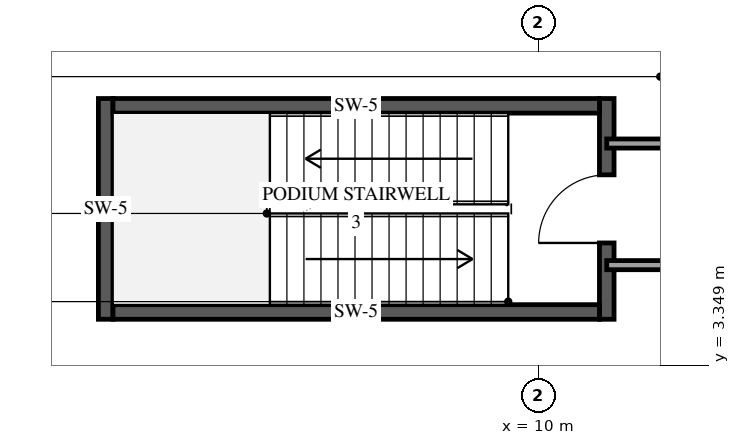
"""IFC4 building model, lengths in metres.
Left out: names, types, materials, properties, quantities, classifications, styles, units other than length and angle.
Written with IfcOpenShell. Run it as: python <this file> out.ifc"""

import sys

from ifc_helpers import new_model, si_unit, direction, frame, frame_2d, origin, place, context, subcontext, project, spatial, rectangle, extrude, element, fill, save


model = new_model("IFC4")
c1 = context("Model", 3, precision=1e-05, world=origin(), true_north=direction((0.0, 1.0)))
c2 = subcontext(c1, "Body", "Model", "MODEL_VIEW")
j1 = project(units=[si_unit("LENGTHUNIT", "METRE"), si_unit("PLANEANGLEUNIT", "RADIAN")], contexts=[c1])
p1 = place(None, origin())
s1 = spatial("IfcSite", under=j1, at=p1, CompositionType="ELEMENT")
p2 = place(p1, origin())
s2 = spatial("IfcBuilding", under=s1, at=p2, CompositionType="ELEMENT")
p3 = place(p2, frame((0.0, 0.0, 6.0)))
s3 = spatial("IfcBuildingStorey", under=s2, at=p3, CompositionType="ELEMENT", Elevation=6.0)
p4 = place(p3, frame((2.88, 4.11, 0.0), z_axis=(0.0, 0.0, 1.0), x_axis=(0.0, 1.0, 0.0)))
e1 = element("IfcWall", 1, at=p4, inside=s3, PredefinedType="SHEAR", context=c2, shape_type="SweptSolid", body=[
    extrude(rectangle(XDim=3.63, YDim=0.24, at=frame_2d((1.815, 0.0))), origin(), (0.0, 0.0, 1.0), 5.4),
])
p5 = place(p3, frame((11.12, 4.11, 0.0), z_axis=(0.0, 0.0, 1.0), x_axis=(0.0, 1.0, 0.0)))
e2 = element("IfcWall", 2, at=p5, inside=s3, PredefinedType="SHEAR", context=c2, shape_type="SweptSolid", body=[
    extrude(rectangle(XDim=3.63, YDim=0.24, at=frame_2d((1.815, 0.0))), origin(), (0.0, 0.0, 1.0), 5.4),
])
p6 = place(p5, frame((1.255, 0.0, 0.0)))
e3 = element("IfcOpeningElement", 3, at=p6, cuts=e2, PredefinedType="OPENING", context=c2, shape_type="SweptSolid", body=[
    extrude(rectangle(XDim=1.12, YDim=2.15, at=frame_2d((0.56, 1.075))), frame((0.0, 0.13, 0.0), z_axis=(0.0, -1.0, 0.0), x_axis=(1.0, 0.0, 0.0)), (0.0, 0.0, 1.0), 0.26),
])
for number, where, z_axis, x_axis in (
    (4, (3.0, 4.23, 0.0), (0.0, 0.0, 1.0), (1.0, 0.0, 0.0)),
    (5, (3.0, 7.62, 0.0), (0.0, 0.0, 1.0), (1.0, 0.0, 0.0)),
):
    element("IfcWall", number, at=place(p3, frame(where, z_axis=z_axis, x_axis=x_axis)), inside=s3, PredefinedType="SHEAR", context=c2, shape_type="SweptSolid", body=[
        extrude(rectangle(XDim=8.0, YDim=0.24, at=frame_2d((4.0, 0.0))), origin(), (0.0, 0.0, 1.0), 5.4),
    ])
p7 = place(p3, frame((46.73, 5.0, 0.0), z_axis=(0.0, 0.0, 1.0), x_axis=(-1.0, 0.0, 0.0)))
e6 = element("IfcWall", 6, at=p7, inside=s3, PredefinedType="PARTITIONING", context=c2, shape_type="SweptSolid", body=[
    extrude(rectangle(XDim=35.61, YDim=0.15, at=frame_2d((17.805, 0.0))), origin(), (0.0, 0.0, 1.0), 5.08),
])
p8 = place(p7, frame((17.33, 0.0, 0.0)))
e7 = element("IfcOpeningElement", 7, at=p8, cuts=e6, PredefinedType="OPENING", context=c2, shape_type="SweptSolid", body=[
    extrude(rectangle(XDim=0.92, YDim=2.12, at=frame_2d((0.46, 1.06))), frame((0.0, 0.085, 0.0), z_axis=(0.0, -1.0, 0.0), x_axis=(1.0, 0.0, 0.0)), (0.0, 0.0, 1.0), 0.17),
])
p9 = place(p3, frame((11.12, 7.0, 0.0), z_axis=(0.0, 0.0, 1.0), x_axis=(1.0, 0.0, 0.0)))
e8 = element("IfcWall", 8, at=p9, inside=s3, PredefinedType="PARTITIONING", context=c2, shape_type="SweptSolid", body=[
    extrude(rectangle(XDim=19.41, YDim=0.15, at=frame_2d((9.705, 0.0))), origin(), (0.0, 0.0, 1.0), 5.08),
])
p10 = place(p6, origin())
e9 = element("IfcDoor", 9, at=p10, inside=s3, OperationType="SINGLE_SWING_LEFT", PredefinedType="DOOR", context=c2, shape_type="SweptSolid", body=[
    extrude(rectangle(XDim=1.12, YDim=2.15, at=frame_2d((0.56, 1.075))), frame((0.0, 0.025, 0.0), z_axis=(0.0, -1.0, 0.0), x_axis=(1.0, 0.0, 0.0)), (0.0, 0.0, 1.0), 0.05),
])
fill(e3, e9)
save(model, sys.argv[1])
